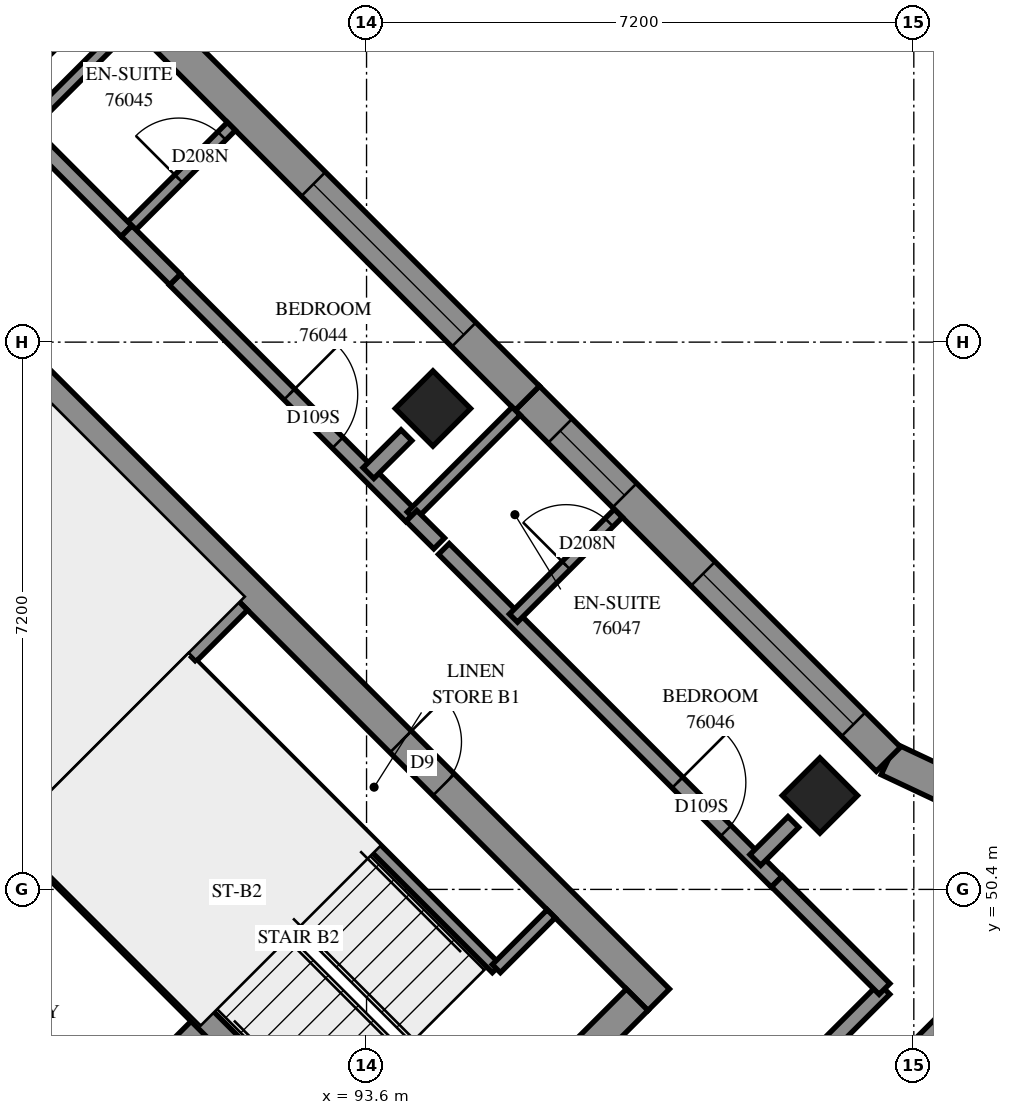
"""IFC4 building model, lengths in metres.
Left out: names, types, materials, properties, quantities, classifications, styles, units other than length and angle.
Written with IfcOpenShell. Run it as: python <this file> out.ifc"""

import sys

from ifc_helpers import new_model, si_unit, direction, frame, frame_2d, origin, origin_2d, place, context, subcontext, project, spatial, polyline, rectangle, outline, extrude, element, fill, save


model = new_model("IFC4")
c1 = context("Model", 3, precision=1e-05, world=origin(), true_north=direction((0.0, 1.0)))
c2 = subcontext(c1, "Body", "Model", "MODEL_VIEW")
j1 = project(units=[si_unit("LENGTHUNIT", "METRE"), si_unit("PLANEANGLEUNIT", "RADIAN")], contexts=[c1])
p1 = place(None, origin())
s1 = spatial("IfcSite", under=j1, at=p1, CompositionType="ELEMENT")
p2 = place(p1, origin())
s2 = spatial("IfcBuilding", under=s1, at=p2, CompositionType="ELEMENT")
p3 = place(p2, frame((0.0, 0.0, 277.8)))
s3 = spatial("IfcBuildingStorey", under=s2, at=p3, CompositionType="ELEMENT", Elevation=277.8)
for number, where, z_axis, x_axis in (
    (1, (89.382, 61.818, 0.0), (0.0, 0.0, 1.0), (0.707, -0.707, 0.0)),
    (2, (94.474, 56.727, 0.0), (0.0, 0.0, 1.0), (0.707, -0.707, 0.0)),
    (3, (99.565, 51.635, 0.0), (0.0, 0.0, 1.0), (0.707, -0.707, 0.0)),
):
    element("IfcColumn", number, at=place(p3, frame(where, z_axis=z_axis, x_axis=x_axis)), inside=s3, PredefinedType="COLUMN", context=c2, shape_type="SweptSolid", body=[
        extrude(rectangle(XDim=0.7, YDim=0.7, at=origin_2d()), origin(), (0.0, 0.0, 1.0), 3.1),
    ])
p4 = place(p3, frame((86.695, 59.696, -0.3), z_axis=(0.0, 0.0, 1.0), x_axis=(0.7071100706, -0.7071034917, 0.0)))
e4 = element("IfcWall", 4, at=p4, inside=s3, PredefinedType="SHEAR", context=c2, shape_type="SweptSolid", body=[
    extrude(rectangle(XDim=15.2, YDim=0.4, at=frame_2d((7.6, 0.0))), origin(), (0.0, 0.0, 1.0), 2.7),
])
p5 = place(p4, frame((10.4, 0.0, 0.3)))
e5 = element("IfcOpeningElement", 5, at=p5, cuts=e4, PredefinedType="OPENING", context=c2, shape_type="SweptSolid", body=[
    extrude(rectangle(XDim=0.8, YDim=2.1, at=frame_2d((0.4, 1.05))), frame((0.0, 0.21, 0.0), z_axis=(0.0, -1.0, 0.0), x_axis=(1.0, 0.0, 0.0)), (0.0, 0.0, 1.0), 0.42),
])
p6 = place(p3, frame((86.978, 38.766, -0.3), z_axis=(0.0, 0.0, 1.0), x_axis=(0.7071067812, 0.7071067812, 0.0)))
e6 = element("IfcWall", 6, at=p6, inside=s3, PredefinedType="SHEAR", context=c2, shape_type="SweptSolid", body=[
    extrude(rectangle(XDim=14.4, YDim=0.4, at=frame_2d((7.2, 0.0))), origin(), (0.0, 0.0, 1.0), 2.7),
])
p7 = place(p6, frame((4.55, 0.0, 0.3)))
e7 = element("IfcOpeningElement", 7, at=p7, cuts=e6, PredefinedType="OPENING", context=c2, shape_type="SweptSolid", body=[
    extrude(rectangle(XDim=1.1, YDim=2.1, at=frame_2d((0.55, 1.05))), frame((0.0, 0.21, 0.0), z_axis=(0.0, -1.0, 0.0), x_axis=(1.0, 0.0, 0.0)), (0.0, 0.0, 1.0), 0.42),
])
p8 = place(p6, frame((11.35, 0.0, 0.3)))
e8 = element("IfcOpeningElement", 8, at=p8, cuts=e6, PredefinedType="OPENING", context=c2, shape_type="SweptSolid", body=[
    extrude(rectangle(XDim=1.1, YDim=2.1, at=frame_2d((0.55, 1.05))), frame((0.0, 0.21, 0.0), z_axis=(0.0, -1.0, 0.0), x_axis=(1.0, 0.0, 0.0)), (0.0, 0.0, 1.0), 0.42),
])
p9 = place(p3, frame((89.17, 46.332, 0.0), z_axis=(0.0, 0.0, 1.0), x_axis=(0.7071067812, 0.7071067812, 0.0)))
e9 = element("IfcWall", 9, at=p9, inside=s3, PredefinedType="SOLIDWALL", context=c2, shape_type="SweptSolid", body=[
    extrude(rectangle(XDim=3.3, YDim=0.3, at=frame_2d((1.65, 0.0))), origin(), (0.0, 0.0, 1.0), 3.1),
])
p10 = place(p3, frame((81.534, 53.969, 0.0), z_axis=(0.0, 0.0, 1.0), x_axis=(0.707103309, -0.7071102534, 0.0)))
e10 = element("IfcWall", 10, at=p10, inside=s3, PredefinedType="SOLIDWALL", context=c2, shape_type="SweptSolid", body=[
    extrude(rectangle(XDim=14.4, YDim=0.3, at=frame_2d((7.2, 0.0))), origin(), (0.0, 0.0, 1.0), 3.1),
])
p11 = place(p10, frame((8.55, 0.0, 0.0)))
e11 = element("IfcOpeningElement", 11, at=p11, cuts=e10, PredefinedType="OPENING", context=c2, shape_type="SweptSolid", body=[
    extrude(rectangle(XDim=0.9, YDim=2.1, at=frame_2d((0.45, 1.05))), frame((0.0, 0.16, 0.0), z_axis=(0.0, -1.0, 0.0), x_axis=(1.0, 0.0, 0.0)), (0.0, 0.0, 1.0), 0.32),
])
p12 = place(p10, frame((1.25, 0.0, 0.0)))
e12 = element("IfcOpeningElement", 12, at=p12, cuts=e10, PredefinedType="OPENING", context=c2, shape_type="SweptSolid", body=[
    extrude(rectangle(XDim=1.1, YDim=2.1, at=frame_2d((0.55, 1.05))), frame((0.0, 0.16, 0.0), z_axis=(0.0, -1.0, 0.0), x_axis=(1.0, 0.0, 0.0)), (0.0, 0.0, 1.0), 0.32),
])
p13 = place(p10, frame((4.85, 0.0, 0.0)))
e13 = element("IfcOpeningElement", 13, at=p13, cuts=e10, PredefinedType="OPENING", context=c2, shape_type="SweptSolid", body=[
    extrude(rectangle(XDim=1.1, YDim=2.1, at=frame_2d((0.55, 1.05))), frame((0.0, 0.16, 0.0), z_axis=(0.0, -1.0, 0.0), x_axis=(1.0, 0.0, 0.0)), (0.0, 0.0, 1.0), 0.32),
])
p14 = place(p10, frame((12.05, 0.0, 0.0)))
e14 = element("IfcOpeningElement", 14, at=p14, cuts=e10, PredefinedType="OPENING", context=c2, shape_type="SweptSolid", body=[
    extrude(rectangle(XDim=1.1, YDim=2.1, at=frame_2d((0.55, 1.05))), frame((0.0, 0.16, 0.0), z_axis=(0.0, -1.0, 0.0), x_axis=(1.0, 0.0, 0.0)), (0.0, 0.0, 1.0), 0.32),
])
p15 = place(p3, frame((88.958, 51.211, 0.0), z_axis=(0.0, 0.0, 1.0), x_axis=(0.7070998367, -0.7071137256, 0.0)))
e15 = element("IfcWall", 15, at=p15, inside=s3, PredefinedType="SOLIDWALL", context=c2, shape_type="SweptSolid", body=[
    extrude(rectangle(XDim=7.2, YDim=0.3, at=frame_2d((3.6, 0.0))), origin(), (0.0, 0.0, 1.0), 3.1),
])
p16 = place(p3, frame((88.958, 51.211, 0.0), z_axis=(0.0, 0.0, 1.0), x_axis=(0.7071067812, 0.7071067812, 0.0)))
e16 = element("IfcWall", 16, at=p16, inside=s3, PredefinedType="SOLIDWALL", context=c2, shape_type="SweptSolid", body=[
    extrude(rectangle(XDim=4.2, YDim=0.3, at=frame_2d((2.1, 0.0))), origin(), (0.0, 0.0, 1.0), 3.1),
])
p17 = place(p3, frame((99.246, 46.544, 0.0), z_axis=(0.0, 0.0, 1.0), x_axis=(0.7071067812, 0.7071067812, 0.0)))
e17 = element("IfcWall", 17, at=p17, inside=s3, PredefinedType="SOLIDWALL", context=c2, shape_type="SweptSolid", body=[
    extrude(outline(polyline([(0.225, -0.225), (6.228, -0.225), (5.588, 0.225), (-0.225, 0.225), (0.225, -0.225)])), origin(), (0.0, 0.0, 1.0), 3.1),
])
p18 = place(p17, frame((0.713, 0.0, 0.6)))
e18 = element("IfcOpeningElement", 18, at=p18, cuts=e17, PredefinedType="OPENING", context=c2, shape_type="SweptSolid", body=[
    extrude(rectangle(XDim=1.8, YDim=1.9, at=frame_2d((0.9, 0.95))), frame((0.0, 0.235, 0.0), z_axis=(0.0, -1.0, 0.0), x_axis=(1.0, 0.0, 0.0)), (0.0, 0.0, 1.0), 0.47),
])
p19 = place(p17, frame((4.006, 0.0, 0.6)))
e19 = element("IfcOpeningElement", 19, at=p19, cuts=e17, PredefinedType="OPENING", context=c2, shape_type="SweptSolid", body=[
    extrude(rectangle(XDim=1.2, YDim=1.9, at=frame_2d((0.6, 0.95))), frame((0.0, 0.235, 0.0), z_axis=(0.0, -1.0, 0.0), x_axis=(1.0, 0.0, 0.0)), (0.0, 0.0, 1.0), 0.47),
])
p20 = place(p3, frame((103.424, 50.722, 0.0), z_axis=(0.0, 0.0, 1.0), x_axis=(-0.9049018861, 0.4256202258, 0.0)))
e20 = element("IfcWall", 20, at=p20, inside=s3, PredefinedType="SOLIDWALL", context=c2, shape_type="SweptSolid", body=[
    extrude(outline(polyline([(-0.32, -0.225), (3.229, -0.225), (3.308, 0.225), (0.32, 0.225), (-0.32, -0.225)])), origin(), (0.0, 0.0, 1.0), 3.1),
])
p21 = place(p20, frame((1.194, 0.0, 0.45)))
e21 = element("IfcOpeningElement", 21, at=p21, cuts=e20, PredefinedType="OPENING", context=c2, shape_type="SweptSolid", body=[
    extrude(rectangle(XDim=1.2, YDim=2.55, at=frame_2d((0.6, 1.275))), frame((0.0, 0.235, 0.0), z_axis=(0.0, -1.0, 0.0), x_axis=(1.0, 0.0, 0.0)), (0.0, 0.0, 1.0), 0.47),
])
p22 = place(p3, frame((100.466, 52.113, 0.0), z_axis=(0.0, 0.0, 1.0), x_axis=(-0.7071067812, 0.7071067812, 0.0)))
e22 = element("IfcWall", 22, at=p22, inside=s3, PredefinedType="SOLIDWALL", context=c2, shape_type="SweptSolid", body=[
    extrude(outline(polyline([(0.039, -0.225), (6.718, -0.225), (6.718, 0.225), (-0.039, 0.225), (0.039, -0.225)])), origin(), (0.0, 0.0, 1.0), 3.1),
])
p23 = place(p22, frame((0.65, 0.0, 0.45)))
e23 = element("IfcOpeningElement", 23, at=p23, cuts=e22, PredefinedType="OPENING", context=c2, shape_type="SweptSolid", body=[
    extrude(rectangle(XDim=2.8, YDim=2.55, at=frame_2d((1.4, 1.275))), frame((0.0, 0.235, 0.0), z_axis=(0.0, -1.0, 0.0), x_axis=(1.0, 0.0, 0.0)), (0.0, 0.0, 1.0), 0.47),
])
p24 = place(p22, frame((4.909, 0.0, 0.45)))
e24 = element("IfcOpeningElement", 24, at=p24, cuts=e22, PredefinedType="OPENING", context=c2, shape_type="SweptSolid", body=[
    extrude(rectangle(XDim=1.2, YDim=2.55, at=frame_2d((0.6, 1.275))), frame((0.0, 0.235, 0.0), z_axis=(0.0, -1.0, 0.0), x_axis=(1.0, 0.0, 0.0)), (0.0, 0.0, 1.0), 0.47),
])
p25 = place(p3, frame((95.716, 56.863, 0.0), z_axis=(0.0, 0.0, 1.0), x_axis=(-0.7071067812, 0.7071067812, 0.0)))
e25 = element("IfcWall", 25, at=p25, inside=s3, PredefinedType="SOLIDWALL", context=c2, shape_type="SweptSolid", body=[
    extrude(outline(polyline([(0.0, -0.225), (6.679, -0.225), (6.719, 0.225), (0.0, 0.225), (0.0, -0.225)])), origin(), (0.0, 0.0, 1.0), 3.1),
])
p26 = place(p25, frame((1.181, 0.0, 0.45)))
e26 = element("IfcOpeningElement", 26, at=p26, cuts=e25, PredefinedType="OPENING", context=c2, shape_type="SweptSolid", body=[
    extrude(rectangle(XDim=2.8, YDim=2.55, at=frame_2d((1.4, 1.275))), frame((0.0, 0.235, 0.0), z_axis=(0.0, -1.0, 0.0), x_axis=(1.0, 0.0, 0.0)), (0.0, 0.0, 1.0), 0.47),
])
p27 = place(p3, frame((91.313, 53.354, 0.0), z_axis=(0.0, 0.0, 1.0), x_axis=(0.7071067812, -0.7071067812, 0.0)))
e27 = element("IfcWall", 27, at=p27, inside=s3, PredefinedType="PARTITIONING", context=c2, shape_type="SweptSolid", body=[
    extrude(rectangle(XDim=5.65, YDim=0.15, at=frame_2d((2.825, 0.0))), origin(), (0.0, 0.0, 1.0), 3.1),
])
p28 = place(p3, frame((95.308, 49.358, 0.0), z_axis=(0.0, 0.0, 1.0), x_axis=(0.70705776, 0.707155799, 0.0)))
e28 = element("IfcWall", 28, at=p28, inside=s3, PredefinedType="PARTITIONING", context=c2, shape_type="SweptSolid", body=[
    extrude(rectangle(XDim=1.02, YDim=0.15, at=frame_2d((0.51, 0.0))), origin(), (0.0, 0.0, 1.0), 3.1),
])
p29 = place(p3, frame((94.331, 43.009, 0.0), z_axis=(0.0, 0.0, 1.0), x_axis=(0.7071067812, 0.7071067812, 0.0)))
e29 = element("IfcWall", 29, at=p29, inside=s3, PredefinedType="PARTITIONING", context=c2, shape_type="SweptSolid", body=[
    extrude(rectangle(XDim=8.601, YDim=0.2, at=frame_2d((4.301, 0.0))), origin(), (0.0, 0.0, 1.0), 3.1),
])
p30 = place(p29, frame((0.194, 0.0, 0.0)))
e30 = element("IfcOpeningElement", 30, at=p30, cuts=e29, PredefinedType="OPENING", context=c2, shape_type="SweptSolid", body=[
    extrude(rectangle(XDim=1.0, YDim=2.1, at=frame_2d((0.5, 1.05))), frame((0.0, 0.11, 0.0), z_axis=(0.0, -1.0, 0.0), x_axis=(1.0, 0.0, 0.0)), (0.0, 0.0, 1.0), 0.22),
])
p31 = place(p3, frame((94.617, 54.879, 0.0), z_axis=(0.0, 0.0, 1.0), x_axis=(0.7071067812, -0.7071067812, 0.0)))
e31 = element("IfcWall", 31, at=p31, inside=s3, PredefinedType="PARTITIONING", context=c2, shape_type="SweptSolid", body=[
    extrude(rectangle(XDim=6.191, YDim=0.2, at=frame_2d((3.096, 0.0))), origin(), (0.0, 0.0, 1.0), 3.1),
])
p32 = place(p31, frame((4.346, 0.0, 0.0)))
e32 = element("IfcOpeningElement", 32, at=p32, cuts=e31, PredefinedType="OPENING", context=c2, shape_type="SweptSolid", body=[
    extrude(rectangle(XDim=0.9, YDim=2.1, at=frame_2d((0.45, 1.05))), frame((0.0, 0.11, 0.0), z_axis=(0.0, -1.0, 0.0), x_axis=(1.0, 0.0, 0.0)), (0.0, 0.0, 1.0), 0.22),
])
p33 = place(p3, frame((91.077, 58.421, 0.0), z_axis=(0.0, 0.0, 1.0), x_axis=(0.7069703926, -0.7072431435, 0.0)))
e33 = element("IfcWall", 33, at=p33, inside=s3, PredefinedType="PARTITIONING", context=c2, shape_type="SweptSolid", body=[
    extrude(rectangle(XDim=4.4, YDim=0.2, at=frame_2d((2.2, 0.0))), origin(), (0.0, 0.0, 1.0), 3.1),
])
p34 = place(p33, frame((2.132, 0.0, 0.0)))
e34 = element("IfcOpeningElement", 34, at=p34, cuts=e33, PredefinedType="OPENING", context=c2, shape_type="SweptSolid", body=[
    extrude(rectangle(XDim=0.9, YDim=2.1, at=frame_2d((0.45, 1.05))), frame((0.0, 0.11, 0.0), z_axis=(0.0, -1.0, 0.0), x_axis=(1.0, 0.0, 0.0)), (0.0, 0.0, 1.0), 0.22),
])
p35 = place(p3, frame((98.998, 50.504, 0.0), z_axis=(0.0, 0.0, 1.0), x_axis=(0.7076063266, -0.7066068826, 0.0)))
e35 = element("IfcWall", 35, at=p35, inside=s3, PredefinedType="PARTITIONING", context=c2, shape_type="SweptSolid", body=[
    extrude(rectangle(XDim=2.001, YDim=0.2, at=frame_2d((1.001, 0.0))), origin(), (0.0, 0.0, 1.0), 3.1),
])
p36 = place(p3, frame((89.099, 60.405, 0.0), z_axis=(0.0, 0.0, 1.0), x_axis=(0.7071067812, 0.7071067812, 0.0)))
e36 = element("IfcWall", 36, at=p36, inside=s3, PredefinedType="PARTITIONING", context=c2, shape_type="SweptSolid", body=[
    extrude(rectangle(XDim=2.033, YDim=0.15, at=frame_2d((1.016, 0.0))), origin(), (0.0, 0.0, 1.0), 3.1),
])
p37 = place(p3, frame((90.442, 59.06, 0.0), z_axis=(0.0, 0.0, 1.0), x_axis=(0.7076448457, 0.7065683069, 0.0)))
e37 = element("IfcWall", 37, at=p37, inside=s3, PredefinedType="PARTITIONING", context=c2, shape_type="SweptSolid", body=[
    extrude(rectangle(XDim=1.951, YDim=0.15, at=frame_2d((0.975, 0.0))), origin(), (0.0, 0.0, 1.0), 3.1),
])
p38 = place(p37, frame((0.973, 0.0, 0.0)))
e38 = element("IfcOpeningElement", 38, at=p38, cuts=e37, PredefinedType="OPENING", context=c2, shape_type="SweptSolid", body=[
    extrude(rectangle(XDim=0.8, YDim=2.1, at=frame_2d((0.4, 1.05))), frame((0.0, 0.085, 0.0), z_axis=(0.0, -1.0, 0.0), x_axis=(1.0, 0.0, 0.0)), (0.0, 0.0, 1.0), 0.17),
])
p39 = place(p3, frame((94.189, 55.313, 0.0), z_axis=(0.0, 0.0, 1.0), x_axis=(0.7070811488, 0.7071324126, 0.0)))
e39 = element("IfcWall", 39, at=p39, inside=s3, PredefinedType="PARTITIONING", context=c2, shape_type="SweptSolid", body=[
    extrude(rectangle(XDim=1.951, YDim=0.15, at=frame_2d((0.975, 0.0))), origin(), (0.0, 0.0, 1.0), 3.1),
])
p40 = place(p3, frame((95.533, 53.969, 0.0), z_axis=(0.0, 0.0, 1.0), x_axis=(0.7070811488, 0.7071324126, 0.0)))
e40 = element("IfcWall", 40, at=p40, inside=s3, PredefinedType="PARTITIONING", context=c2, shape_type="SweptSolid", body=[
    extrude(rectangle(XDim=1.951, YDim=0.15, at=frame_2d((0.975, 0.0))), origin(), (0.0, 0.0, 1.0), 3.1),
])
p41 = place(p40, frame((0.98, 0.0, 0.0)))
e41 = element("IfcOpeningElement", 41, at=p41, cuts=e40, PredefinedType="OPENING", context=c2, shape_type="SweptSolid", body=[
    extrude(rectangle(XDim=0.8, YDim=2.1, at=frame_2d((0.4, 1.05))), frame((0.0, 0.085, 0.0), z_axis=(0.0, -1.0, 0.0), x_axis=(1.0, 0.0, 0.0)), (0.0, 0.0, 1.0), 0.17),
])
p42 = place(p3, frame((89.1, 60.404, 0.0), z_axis=(0.0, 0.0, 1.0), x_axis=(0.7065800724, -0.7076330979, 0.0)))
e42 = element("IfcWall", 42, at=p42, inside=s3, PredefinedType="PARTITIONING", context=c2, shape_type="SweptSolid", body=[
    extrude(rectangle(XDim=1.899, YDim=0.2, at=frame_2d((0.95, 0.0))), origin(), (0.0, 0.0, 1.0), 3.1),
])
p43 = place(p3, frame((90.443, 59.061, 0.0), z_axis=(0.0, 0.0, 1.0), x_axis=(0.7082159662, -0.7059958535, 0.0)))
e43 = element("IfcWall", 43, at=p43, inside=s3, PredefinedType="PARTITIONING", context=c2, shape_type="SweptSolid", body=[
    extrude(rectangle(XDim=0.901, YDim=0.2, at=frame_2d((0.451, 0.0))), origin(), (0.0, 0.0, 1.0), 3.1),
])
p44 = place(p3, frame((98.715, 50.787, 0.0), z_axis=(0.0, 0.0, 1.0), x_axis=(0.7071067812, 0.7071067812, 0.0)))
e44 = element("IfcWall", 44, at=p44, inside=s3, PredefinedType="PARTITIONING", context=c2, shape_type="SweptSolid", body=[
    extrude(rectangle(XDim=0.707, YDim=0.2, at=frame_2d((0.353, 0.0))), origin(), (0.0, 0.0, 1.0), 3.1),
])
p45 = place(p3, frame((93.625, 55.877, 0.0), z_axis=(0.0, 0.0, 1.0), x_axis=(0.7085224061, 0.7056883165, 0.0)))
e45 = element("IfcWall", 45, at=p45, inside=s3, PredefinedType="PARTITIONING", context=c2, shape_type="SweptSolid", body=[
    extrude(rectangle(XDim=0.706, YDim=0.2, at=frame_2d((0.353, 0.0))), origin(), (0.0, 0.0, 1.0), 3.1),
])
p46 = place(p3, frame((94.192, 55.314, 0.0), z_axis=(0.0, 0.0, 1.0), x_axis=(0.7090520432, -0.7051561529, 0.0)))
e46 = element("IfcWall", 46, at=p46, inside=s3, PredefinedType="PARTITIONING", context=c2, shape_type="SweptSolid", body=[
    extrude(rectangle(XDim=0.513, YDim=0.2, at=frame_2d((0.257, 0.0))), origin(), (0.0, 0.0, 1.0), 3.1),
])
p47 = place(p23, origin())
e47 = element("IfcWindow", 47, at=p47, inside=s3, PartitioningType="SINGLE_PANEL", PredefinedType="WINDOW", context=c2, shape_type="SweptSolid", body=[
    extrude(rectangle(XDim=2.8, YDim=2.55, at=frame_2d((1.4, 1.275))), frame((0.0, 0.205, 0.0), z_axis=(0.0, -1.0, 0.0), x_axis=(1.0, 0.0, 0.0)), (0.0, 0.0, 1.0), 0.06),
])
fill(e23, e47)
p48 = place(p24, origin())
e48 = element("IfcWindow", 48, at=p48, inside=s3, PartitioningType="SINGLE_PANEL", PredefinedType="WINDOW", context=c2, shape_type="SweptSolid", body=[
    extrude(rectangle(XDim=1.2, YDim=2.55, at=frame_2d((0.6, 1.275))), frame((0.0, 0.205, 0.0), z_axis=(0.0, -1.0, 0.0), x_axis=(1.0, 0.0, 0.0)), (0.0, 0.0, 1.0), 0.06),
])
fill(e24, e48)
p49 = place(p26, origin())
e49 = element("IfcWindow", 49, at=p49, inside=s3, PartitioningType="SINGLE_PANEL", PredefinedType="WINDOW", context=c2, shape_type="SweptSolid", body=[
    extrude(rectangle(XDim=2.8, YDim=2.55, at=frame_2d((1.4, 1.275))), frame((0.0, 0.205, 0.0), z_axis=(0.0, -1.0, 0.0), x_axis=(1.0, 0.0, 0.0)), (0.0, 0.0, 1.0), 0.06),
])
fill(e26, e49)
p50 = place(p5, origin())
e50 = element("IfcDoor", 50, at=p50, inside=s3, OperationType="SINGLE_SWING_RIGHT", PredefinedType="DOOR", context=c2, shape_type="SweptSolid", body=[
    extrude(rectangle(XDim=0.8, YDim=2.1, at=frame_2d((0.4, 1.05))), frame((0.0, 0.025, 0.0), z_axis=(0.0, -1.0, 0.0), x_axis=(1.0, 0.0, 0.0)), (0.0, 0.0, 1.0), 0.05),
])
fill(e5, e50)
p51 = place(p34, origin())
e51 = element("IfcDoor", 51, at=p51, inside=s3, OperationType="SINGLE_SWING_LEFT", PredefinedType="DOOR", context=c2, shape_type="SweptSolid", body=[
    extrude(rectangle(XDim=0.9, YDim=2.1, at=frame_2d((0.45, 1.05))), frame((0.0, 0.025, 0.0), z_axis=(0.0, -1.0, 0.0), x_axis=(1.0, 0.0, 0.0)), (0.0, 0.0, 1.0), 0.05),
])
fill(e34, e51)
p52 = place(p38, origin())
e52 = element("IfcDoor", 52, at=p52, inside=s3, OperationType="SINGLE_SWING_RIGHT", PredefinedType="DOOR", context=c2, shape_type="SweptSolid", body=[
    extrude(rectangle(XDim=0.8, YDim=2.1, at=frame_2d((0.4, 1.05))), frame((0.0, 0.025, 0.0), z_axis=(0.0, -1.0, 0.0), x_axis=(1.0, 0.0, 0.0)), (0.0, 0.0, 1.0), 0.05),
])
fill(e38, e52)
p53 = place(p32, origin())
e53 = element("IfcDoor", 53, at=p53, inside=s3, OperationType="SINGLE_SWING_LEFT", PredefinedType="DOOR", context=c2, shape_type="SweptSolid", body=[
    extrude(rectangle(XDim=0.9, YDim=2.1, at=frame_2d((0.45, 1.05))), frame((0.0, 0.025, 0.0), z_axis=(0.0, -1.0, 0.0), x_axis=(1.0, 0.0, 0.0)), (0.0, 0.0, 1.0), 0.05),
])
fill(e32, e53)
p54 = place(p41, origin())
e54 = element("IfcDoor", 54, at=p54, inside=s3, OperationType="SINGLE_SWING_RIGHT", PredefinedType="DOOR", context=c2, shape_type="SweptSolid", body=[
    extrude(rectangle(XDim=0.8, YDim=2.1, at=frame_2d((0.4, 1.05))), frame((0.0, 0.025, 0.0), z_axis=(0.0, -1.0, 0.0), x_axis=(1.0, 0.0, 0.0)), (0.0, 0.0, 1.0), 0.05),
])
fill(e41, e54)
save(model, sys.argv[1])
